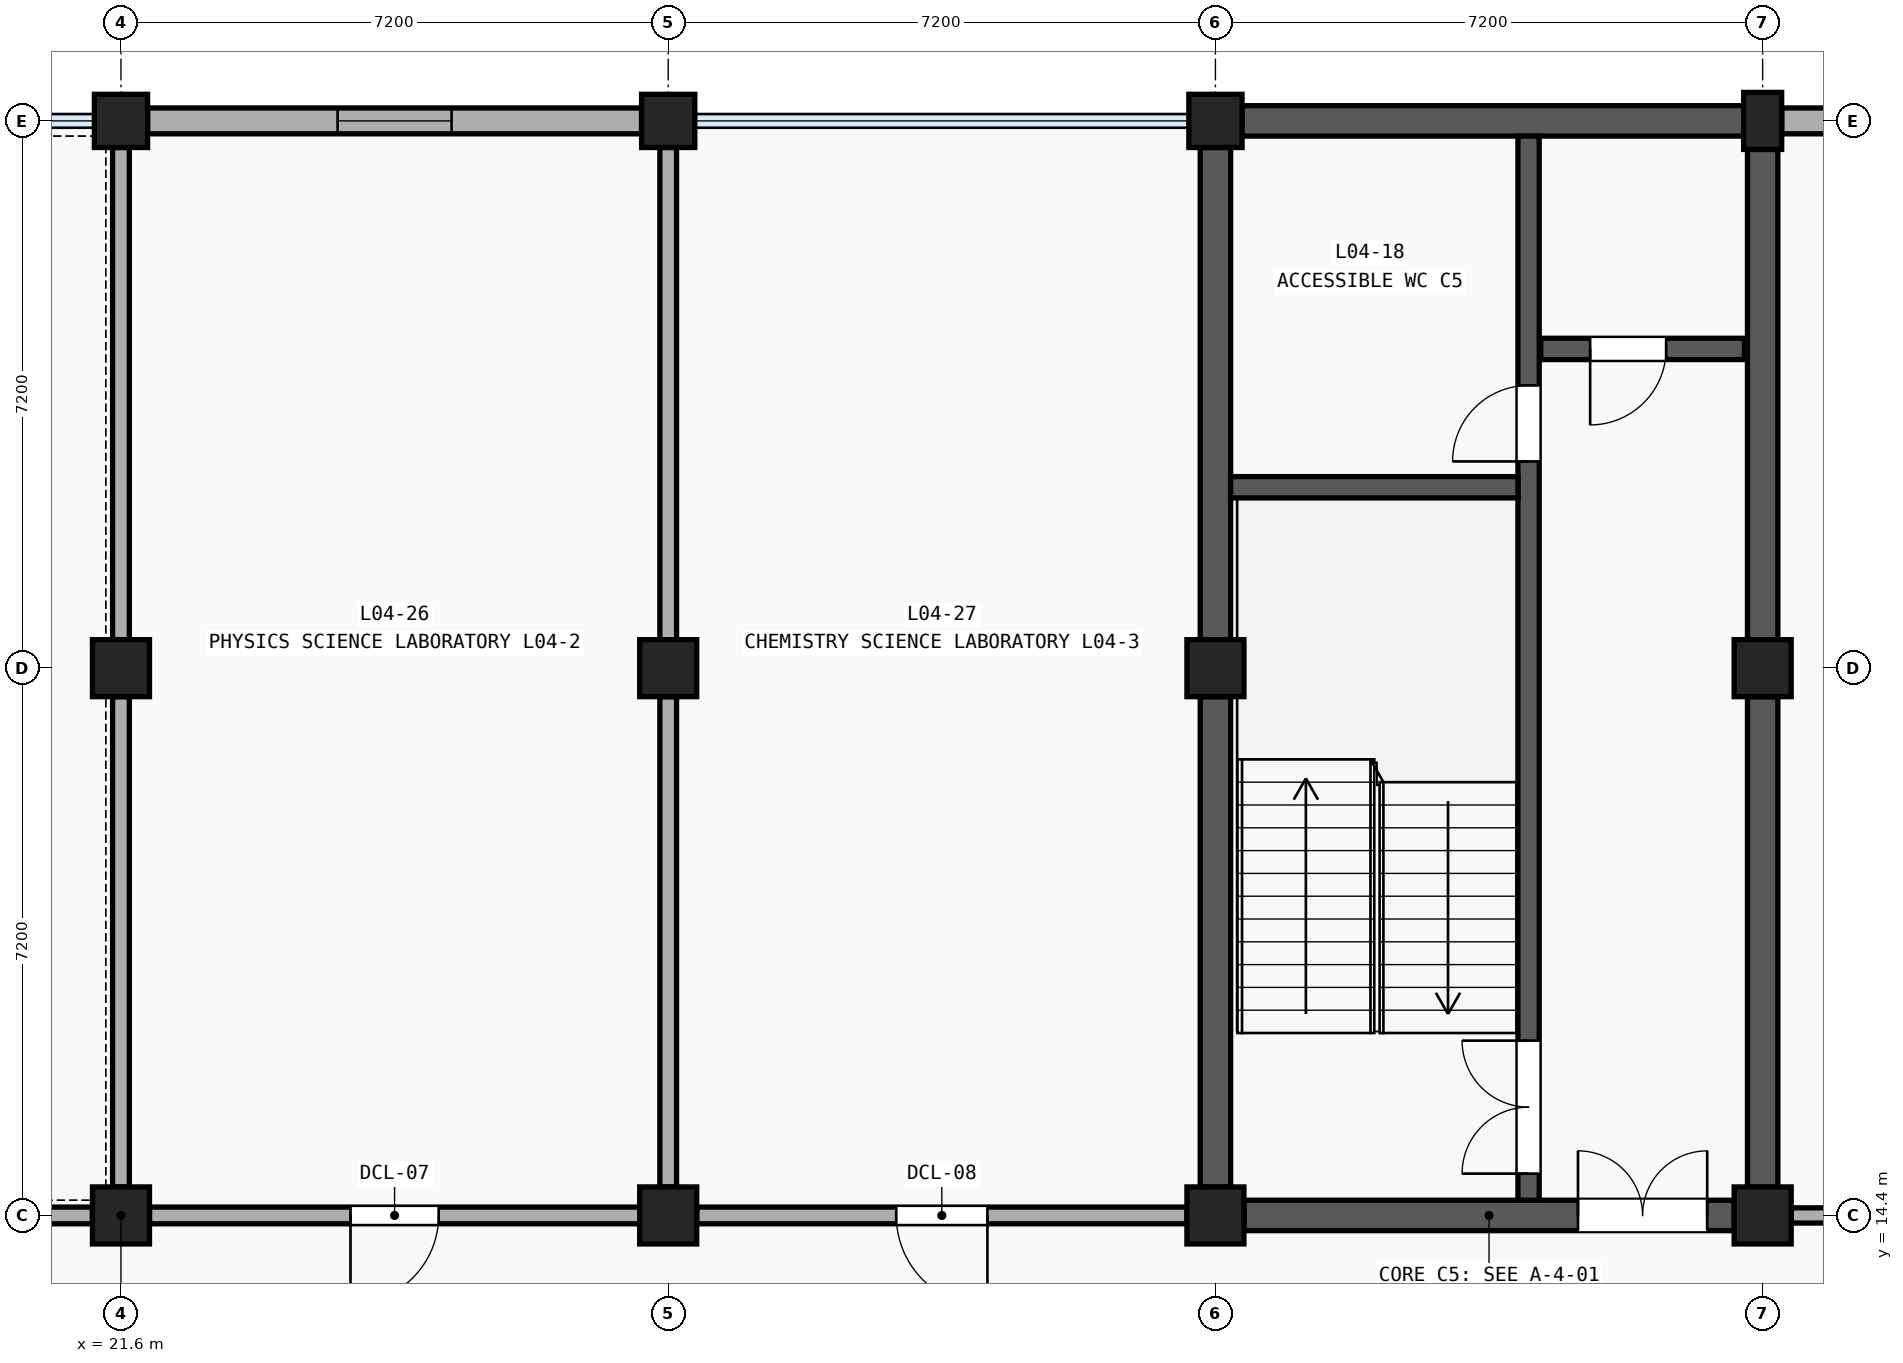
"""IFC4 building model, lengths in metres.
Left out: names, types, materials, properties, quantities, classifications, styles, units other than length and angle.
Written with IfcOpenShell. Run it as: python <this file> out.ifc"""

import sys

from ifc_helpers import new_model, si_unit, direction, frame, frame_2d, origin, origin_2d, place, context, subcontext, project, spatial, rectangle, extrude, element, fill, save


model = new_model("IFC4")
c1 = context("Model", 3, precision=1e-05, world=origin(), true_north=direction((0.0, 1.0)))
c2 = subcontext(c1, "Body", "Model", "MODEL_VIEW")
j1 = project(units=[si_unit("LENGTHUNIT", "METRE"), si_unit("PLANEANGLEUNIT", "RADIAN")], contexts=[c1])
p1 = place(None, origin())
s1 = spatial("IfcSite", under=j1, at=p1, CompositionType="ELEMENT")
p2 = place(p1, origin())
s2 = spatial("IfcBuilding", under=s1, at=p2, CompositionType="ELEMENT")
p3 = place(p2, frame((0.0, 0.0, 18.6)))
s3 = spatial("IfcBuildingStorey", under=s2, at=p3, CompositionType="ELEMENT", Elevation=18.6)
for number, where, z_axis, x_axis in (
    (1, (21.6, 14.4, 0.0), (0.0, 0.0, 1.0), (1.0, 0.0, 0.0)),
    (2, (21.6, 21.6, 0.0), (0.0, 0.0, 1.0), (1.0, 0.0, 0.0)),
):
    element("IfcColumn", number, at=place(p3, frame(where, z_axis=z_axis, x_axis=x_axis)), inside=s3, PredefinedType="COLUMN", context=c2, shape_type="SweptSolid", body=[
        extrude(rectangle(XDim=0.75, YDim=0.75, at=origin_2d()), origin(), (0.0, 0.0, 1.0), 4.0),
    ])
p4 = place(p3, frame((21.6, 28.8, 0.0), z_axis=(0.0, 0.0, 1.0), x_axis=(1.0, 0.0, 0.0)))
e3 = element("IfcColumn", 3, at=p4, inside=s3, PredefinedType="COLUMN", context=c2, shape_type="SweptSolid", body=[
    extrude(rectangle(XDim=0.7, YDim=0.7, at=origin_2d()), origin(), (0.0, 0.0, 1.0), 4.0),
])
for number, where, z_axis, x_axis in (
    (4, (28.8, 14.4, 0.0), (0.0, 0.0, 1.0), (1.0, 0.0, 0.0)),
    (5, (28.8, 21.6, 0.0), (0.0, 0.0, 1.0), (1.0, 0.0, 0.0)),
):
    element("IfcColumn", number, at=place(p3, frame(where, z_axis=z_axis, x_axis=x_axis)), inside=s3, PredefinedType="COLUMN", context=c2, shape_type="SweptSolid", body=[
        extrude(rectangle(XDim=0.75, YDim=0.75, at=origin_2d()), origin(), (0.0, 0.0, 1.0), 4.0),
    ])
p5 = place(p3, frame((28.8, 28.8, 0.0), z_axis=(0.0, 0.0, 1.0), x_axis=(1.0, 0.0, 0.0)))
e6 = element("IfcColumn", 6, at=p5, inside=s3, PredefinedType="COLUMN", context=c2, shape_type="SweptSolid", body=[
    extrude(rectangle(XDim=0.7, YDim=0.7, at=origin_2d()), origin(), (0.0, 0.0, 1.0), 4.0),
])
for number, where, z_axis, x_axis in (
    (7, (36.0, 14.4, 0.0), (0.0, 0.0, 1.0), (1.0, 0.0, 0.0)),
    (8, (36.0, 21.6, 0.0), (0.0, 0.0, 1.0), (1.0, 0.0, 0.0)),
):
    element("IfcColumn", number, at=place(p3, frame(where, z_axis=z_axis, x_axis=x_axis)), inside=s3, PredefinedType="COLUMN", context=c2, shape_type="SweptSolid", body=[
        extrude(rectangle(XDim=0.75, YDim=0.75, at=origin_2d()), origin(), (0.0, 0.0, 1.0), 4.0),
    ])
p6 = place(p3, frame((36.0, 28.8, 0.0), z_axis=(0.0, 0.0, 1.0), x_axis=(1.0, 0.0, 0.0)))
e9 = element("IfcColumn", 9, at=p6, inside=s3, PredefinedType="COLUMN", context=c2, shape_type="SweptSolid", body=[
    extrude(rectangle(XDim=0.7, YDim=0.7, at=origin_2d()), origin(), (0.0, 0.0, 1.0), 4.0),
])
for number, where, z_axis, x_axis in (
    (10, (43.2, 14.4, 0.0), (0.0, 0.0, 1.0), (1.0, 0.0, 0.0)),
    (11, (43.2, 21.6, 0.0), (0.0, 0.0, 1.0), (1.0, 0.0, 0.0)),
):
    element("IfcColumn", number, at=place(p3, frame(where, z_axis=z_axis, x_axis=x_axis)), inside=s3, PredefinedType="COLUMN", context=c2, shape_type="SweptSolid", body=[
        extrude(rectangle(XDim=0.75, YDim=0.75, at=origin_2d()), origin(), (0.0, 0.0, 1.0), 4.0),
    ])
p7 = place(p3, frame((43.2, 28.8, 0.0), z_axis=(0.0, 0.0, 1.0), x_axis=(1.0, 0.0, 0.0)))
e12 = element("IfcColumn", 12, at=p7, inside=s3, PredefinedType="PILASTER", context=c2, shape_type="SweptSolid", body=[
    extrude(rectangle(XDim=0.5, YDim=0.75, at=origin_2d()), origin(), (0.0, 0.0, 1.0), 4.0),
])
p8 = place(p3, frame((21.95, 28.8, 0.0), z_axis=(0.0, 0.0, 1.0), x_axis=(1.0, 0.0, 0.0)))
e13 = element("IfcWall", 13, at=p8, inside=s3, PredefinedType="SOLIDWALL", context=c2, shape_type="SweptSolid", body=[
    extrude(rectangle(XDim=6.5, YDim=0.34, at=frame_2d((3.25, 0.0))), origin(), (0.0, 0.0, 1.0), 3.11),
])
p9 = place(p8, frame((2.5, 0.0, 1.1)))
e14 = element("IfcOpeningElement", 14, at=p9, cuts=e13, PredefinedType="OPENING", context=c2, shape_type="SweptSolid", body=[
    extrude(rectangle(XDim=1.5, YDim=1.35, at=frame_2d((0.75, 0.675))), frame((0.0, 0.182, 0.0), z_axis=(0.0, -1.0, 0.0), x_axis=(1.0, 0.0, 0.0)), (0.0, 0.0, 1.0), 0.364),
])
p10 = place(p3, frame((43.45, 28.8, 0.0), z_axis=(0.0, 0.0, 1.0), x_axis=(1.0, 0.0, 0.0)))
e15 = element("IfcWall", 15, at=p10, inside=s3, PredefinedType="SOLIDWALL", context=c2, shape_type="SweptSolid", body=[
    extrude(rectangle(XDim=6.6, YDim=0.34, at=frame_2d((3.3, 0.0))), origin(), (0.0, 0.0, 1.0), 3.11),
])
p11 = place(p10, frame((2.55, 0.0, 1.1)))
e16 = element("IfcOpeningElement", 16, at=p11, cuts=e15, PredefinedType="OPENING", context=c2, shape_type="SweptSolid", body=[
    extrude(rectangle(XDim=1.5, YDim=1.35, at=frame_2d((0.75, 0.675))), frame((0.0, 0.182, 0.0), z_axis=(0.0, -1.0, 0.0), x_axis=(1.0, 0.0, 0.0)), (0.0, 0.0, 1.0), 0.364),
])
p12 = place(p3, frame((36.0, 14.775, 0.0), z_axis=(0.0, 0.0, 1.0), x_axis=(0.0, 1.0, 0.0)))
e17 = element("IfcWall", 17, at=p12, inside=s3, PredefinedType="SHEAR", context=c2, shape_type="SweptSolid", body=[
    extrude(rectangle(XDim=6.45, YDim=0.4, at=frame_2d((3.225, 0.0))), origin(), (0.0, 0.0, 1.0), 2.97),
])
p13 = place(p3, frame((36.0, 21.975, 0.0), z_axis=(0.0, 0.0, 1.0), x_axis=(0.0, 1.0, 0.0)))
e18 = element("IfcWall", 18, at=p13, inside=s3, PredefinedType="SHEAR", context=c2, shape_type="SweptSolid", body=[
    extrude(rectangle(XDim=6.475, YDim=0.4, at=frame_2d((3.237, 0.0))), origin(), (0.0, 0.0, 1.0), 2.97),
])
p14 = place(p3, frame((43.2, 14.775, 0.0), z_axis=(0.0, 0.0, 1.0), x_axis=(0.0, 1.0, 0.0)))
e19 = element("IfcWall", 19, at=p14, inside=s3, PredefinedType="SHEAR", context=c2, shape_type="SweptSolid", body=[
    extrude(rectangle(XDim=6.45, YDim=0.4, at=frame_2d((3.225, 0.0))), origin(), (0.0, 0.0, 1.0), 2.97),
])
p15 = place(p3, frame((43.2, 21.975, 0.0), z_axis=(0.0, 0.0, 1.0), x_axis=(0.0, 1.0, 0.0)))
e20 = element("IfcWall", 20, at=p15, inside=s3, PredefinedType="SHEAR", context=c2, shape_type="SweptSolid", body=[
    extrude(rectangle(XDim=6.45, YDim=0.4, at=frame_2d((3.225, 0.0))), origin(), (0.0, 0.0, 1.0), 2.97),
])
p16 = place(p3, frame((36.375, 14.4, 0.0), z_axis=(0.0, 0.0, 1.0), x_axis=(1.0, 0.0, 0.0)))
e21 = element("IfcWall", 21, at=p16, inside=s3, PredefinedType="SHEAR", context=c2, shape_type="SweptSolid", body=[
    extrude(rectangle(XDim=6.45, YDim=0.4, at=frame_2d((3.225, 0.0))), origin(), (0.0, 0.0, 1.0), 2.97),
])
p17 = place(p16, frame((4.395, 0.0, 0.0)))
e22 = element("IfcOpeningElement", 22, at=p17, cuts=e21, PredefinedType="OPENING", context=c2, shape_type="SweptSolid", body=[
    extrude(rectangle(XDim=1.7, YDim=2.25, at=frame_2d((0.85, 1.125))), frame((0.0, 0.212, 0.0), z_axis=(0.0, -1.0, 0.0), x_axis=(1.0, 0.0, 0.0)), (0.0, 0.0, 1.0), 0.424),
])
p18 = place(p3, frame((36.35, 28.8, 0.0), z_axis=(0.0, 0.0, 1.0), x_axis=(1.0, 0.0, 0.0)))
e23 = element("IfcWall", 23, at=p18, inside=s3, PredefinedType="SHEAR", context=c2, shape_type="SweptSolid", body=[
    extrude(rectangle(XDim=6.6, YDim=0.4, at=frame_2d((3.3, 0.0))), origin(), (0.0, 0.0, 1.0), 3.11),
])
p19 = place(p3, frame((40.12, 14.6, 0.0), z_axis=(0.0, 0.0, 1.0), x_axis=(0.0, 1.0, 0.0)))
e24 = element("IfcWall", 24, at=p19, inside=s3, PredefinedType="SHEAR", context=c2, shape_type="SweptSolid", body=[
    extrude(rectangle(XDim=14.0, YDim=0.28, at=frame_2d((7.0, 0.0))), origin(), (0.0, 0.0, 1.0), 3.74),
])
p20 = place(p19, frame((0.35, 0.0, 0.0)))
e25 = element("IfcOpeningElement", 25, at=p20, cuts=e24, PredefinedType="OPENING", context=c2, shape_type="SweptSolid", body=[
    extrude(rectangle(XDim=1.75, YDim=2.15, at=frame_2d((0.875, 1.075))), frame((0.0, 0.152, 0.0), z_axis=(0.0, -1.0, 0.0), x_axis=(1.0, 0.0, 0.0)), (0.0, 0.0, 1.0), 0.304),
])
p21 = place(p19, frame((9.72, 0.0, 0.0)))
e26 = element("IfcOpeningElement", 26, at=p21, cuts=e24, PredefinedType="OPENING", context=c2, shape_type="SweptSolid", body=[
    extrude(rectangle(XDim=1.0, YDim=2.15, at=frame_2d((0.5, 1.075))), frame((0.0, 0.152, 0.0), z_axis=(0.0, -1.0, 0.0), x_axis=(1.0, 0.0, 0.0)), (0.0, 0.0, 1.0), 0.304),
])
p22 = place(p3, frame((36.2, 23.98, 0.0), z_axis=(0.0, 0.0, 1.0), x_axis=(1.0, 0.0, 0.0)))
e27 = element("IfcWall", 27, at=p22, inside=s3, PredefinedType="SHEAR", context=c2, shape_type="SweptSolid", body=[
    extrude(rectangle(XDim=3.78, YDim=0.28, at=frame_2d((1.89, 0.0))), origin(), (0.0, 0.0, 1.0), 3.74),
])
p23 = place(p3, frame((40.28, 25.8, 0.0), z_axis=(0.0, 0.0, 1.0), x_axis=(1.0, 0.0, 0.0)))
e28 = element("IfcWall", 28, at=p23, inside=s3, PredefinedType="SHEAR", context=c2, shape_type="SweptSolid", body=[
    extrude(rectangle(XDim=2.68, YDim=0.28, at=frame_2d((1.34, 0.0))), origin(), (0.0, 0.0, 1.0), 3.74),
])
p24 = place(p23, frame((0.65, 0.0, 0.0)))
e29 = element("IfcOpeningElement", 29, at=p24, cuts=e28, PredefinedType="OPENING", context=c2, shape_type="SweptSolid", body=[
    extrude(rectangle(XDim=1.0, YDim=2.15, at=frame_2d((0.5, 1.075))), frame((0.0, 0.152, 0.0), z_axis=(0.0, -1.0, 0.0), x_axis=(1.0, 0.0, 0.0)), (0.0, 0.0, 1.0), 0.304),
])
p25 = place(p3, frame((14.75, 14.4, 0.0), z_axis=(0.0, 0.0, 1.0), x_axis=(1.0, 0.0, 0.0)))
e30 = element("IfcWall", 30, at=p25, inside=s3, PredefinedType="PARTITIONING", context=c2, shape_type="SweptSolid", body=[
    extrude(rectangle(XDim=6.475, YDim=0.22, at=frame_2d((3.238, 0.0))), origin(), (0.0, 0.0, 1.0), 3.04),
])
p26 = place(p25, frame((2.677, 0.0, 0.0)))
e31 = element("IfcOpeningElement", 31, at=p26, cuts=e30, PredefinedType="OPENING", context=c2, shape_type="SweptSolid", body=[
    extrude(rectangle(XDim=1.12, YDim=2.2, at=frame_2d((0.56, 1.1))), frame((0.0, 0.122, 0.0), z_axis=(0.0, -1.0, 0.0), x_axis=(1.0, 0.0, 0.0)), (0.0, 0.0, 1.0), 0.244),
])
p27 = place(p3, frame((21.6, 14.775, 0.0), z_axis=(0.0, 0.0, 1.0), x_axis=(0.0, 1.0, 0.0)))
e32 = element("IfcWall", 32, at=p27, inside=s3, PredefinedType="PARTITIONING", context=c2, shape_type="SweptSolid", body=[
    extrude(rectangle(XDim=6.45, YDim=0.22, at=frame_2d((3.225, 0.0))), origin(), (0.0, 0.0, 1.0), 2.97),
])
p28 = place(p3, frame((21.6, 21.975, 0.0), z_axis=(0.0, 0.0, 1.0), x_axis=(0.0, 1.0, 0.0)))
e33 = element("IfcWall", 33, at=p28, inside=s3, PredefinedType="PARTITIONING", context=c2, shape_type="SweptSolid", body=[
    extrude(rectangle(XDim=6.475, YDim=0.22, at=frame_2d((3.237, 0.0))), origin(), (0.0, 0.0, 1.0), 2.97),
])
p29 = place(p3, frame((21.975, 14.4, 0.0), z_axis=(0.0, 0.0, 1.0), x_axis=(1.0, 0.0, 0.0)))
e34 = element("IfcWall", 34, at=p29, inside=s3, PredefinedType="PARTITIONING", context=c2, shape_type="SweptSolid", body=[
    extrude(rectangle(XDim=6.45, YDim=0.22, at=frame_2d((3.225, 0.0))), origin(), (0.0, 0.0, 1.0), 2.97),
])
p30 = place(p29, frame((2.645, 0.0, 0.0)))
e35 = element("IfcOpeningElement", 35, at=p30, cuts=e34, PredefinedType="OPENING", context=c2, shape_type="SweptSolid", body=[
    extrude(rectangle(XDim=1.16, YDim=2.22, at=frame_2d((0.58, 1.11))), frame((0.0, 0.122, 0.0), z_axis=(0.0, -1.0, 0.0), x_axis=(1.0, 0.0, 0.0)), (0.0, 0.0, 1.0), 0.244),
])
p31 = place(p3, frame((28.8, 14.775, 0.0), z_axis=(0.0, 0.0, 1.0), x_axis=(0.0, 1.0, 0.0)))
e36 = element("IfcWall", 36, at=p31, inside=s3, PredefinedType="PARTITIONING", context=c2, shape_type="SweptSolid", body=[
    extrude(rectangle(XDim=6.45, YDim=0.22, at=frame_2d((3.225, 0.0))), origin(), (0.0, 0.0, 1.0), 2.97),
])
p32 = place(p3, frame((28.8, 21.975, 0.0), z_axis=(0.0, 0.0, 1.0), x_axis=(0.0, 1.0, 0.0)))
e37 = element("IfcWall", 37, at=p32, inside=s3, PredefinedType="PARTITIONING", context=c2, shape_type="SweptSolid", body=[
    extrude(rectangle(XDim=6.475, YDim=0.22, at=frame_2d((3.237, 0.0))), origin(), (0.0, 0.0, 1.0), 2.97),
])
p33 = place(p3, frame((29.175, 14.4, 0.0), z_axis=(0.0, 0.0, 1.0), x_axis=(1.0, 0.0, 0.0)))
e38 = element("IfcWall", 38, at=p33, inside=s3, PredefinedType="PARTITIONING", context=c2, shape_type="SweptSolid", body=[
    extrude(rectangle(XDim=6.45, YDim=0.22, at=frame_2d((3.225, 0.0))), origin(), (0.0, 0.0, 1.0), 2.97),
])
p34 = place(p33, frame((2.625, 0.0, 0.0)))
e39 = element("IfcOpeningElement", 39, at=p34, cuts=e38, PredefinedType="OPENING", context=c2, shape_type="SweptSolid", body=[
    extrude(rectangle(XDim=1.2, YDim=2.24, at=frame_2d((0.6, 1.12))), frame((0.0, 0.122, 0.0), z_axis=(0.0, -1.0, 0.0), x_axis=(1.0, 0.0, 0.0)), (0.0, 0.0, 1.0), 0.244),
])
p35 = place(p3, frame((43.575, 14.4, 0.0), z_axis=(0.0, 0.0, 1.0), x_axis=(1.0, 0.0, 0.0)))
e40 = element("IfcWall", 40, at=p35, inside=s3, PredefinedType="PARTITIONING", context=c2, shape_type="SweptSolid", body=[
    extrude(rectangle(XDim=6.45, YDim=0.2, at=frame_2d((3.225, 0.0))), origin(), (0.0, 0.0, 1.0), 3.04),
])
p36 = place(p35, frame((2.605, 0.0, 0.0)))
e41 = element("IfcOpeningElement", 41, at=p36, cuts=e40, PredefinedType="OPENING", context=c2, shape_type="SweptSolid", body=[
    extrude(rectangle(XDim=1.24, YDim=2.26, at=frame_2d((0.62, 1.13))), frame((0.0, 0.112, 0.0), z_axis=(0.0, -1.0, 0.0), x_axis=(1.0, 0.0, 0.0)), (0.0, 0.0, 1.0), 0.224),
])
p37 = place(p9, origin())
e42 = element("IfcWindow", 42, at=p37, inside=s3, PartitioningType="SINGLE_PANEL", PredefinedType="WINDOW", context=c2, shape_type="SweptSolid", body=[
    extrude(rectangle(XDim=1.5, YDim=1.35, at=frame_2d((0.75, 0.675))), frame((0.0, 0.03, 0.0), z_axis=(0.0, -1.0, 0.0), x_axis=(1.0, 0.0, 0.0)), (0.0, 0.0, 1.0), 0.06),
])
fill(e14, e42)
p38 = place(p17, origin())
e43 = element("IfcDoor", 43, at=p38, inside=s3, OperationType="DOUBLE_DOOR_SINGLE_SWING", PredefinedType="DOOR", context=c2, shape_type="SweptSolid", body=[
    extrude(rectangle(XDim=1.7, YDim=2.25, at=frame_2d((0.85, 1.125))), frame((0.0, 0.025, 0.0), z_axis=(0.0, -1.0, 0.0), x_axis=(1.0, 0.0, 0.0)), (0.0, 0.0, 1.0), 0.05),
])
fill(e22, e43)
p39 = place(p20, origin())
e44 = element("IfcDoor", 44, at=p39, inside=s3, OperationType="DOUBLE_DOOR_SINGLE_SWING", PredefinedType="DOOR", context=c2, shape_type="SweptSolid", body=[
    extrude(rectangle(XDim=1.75, YDim=2.15, at=frame_2d((0.875, 1.075))), frame((0.0, 0.025, 0.0), z_axis=(0.0, -1.0, 0.0), x_axis=(1.0, 0.0, 0.0)), (0.0, 0.0, 1.0), 0.05),
])
fill(e25, e44)
p40 = place(p21, origin())
e45 = element("IfcDoor", 45, at=p40, inside=s3, OperationType="SINGLE_SWING_LEFT", PredefinedType="DOOR", context=c2, shape_type="SweptSolid", body=[
    extrude(rectangle(XDim=1.0, YDim=2.15, at=frame_2d((0.5, 1.075))), frame((0.0, 0.025, 0.0), z_axis=(0.0, -1.0, 0.0), x_axis=(1.0, 0.0, 0.0)), (0.0, 0.0, 1.0), 0.05),
])
fill(e26, e45)
p41 = place(p24, frame((1.0, 0.0, 0.0), z_axis=(0.0, 0.0, 1.0), x_axis=(-1.0, 0.0, 0.0)))
e46 = element("IfcDoor", 46, at=p41, inside=s3, OperationType="SINGLE_SWING_RIGHT", PredefinedType="DOOR", context=c2, shape_type="SweptSolid", body=[
    extrude(rectangle(XDim=1.0, YDim=2.15, at=frame_2d((0.5, 1.075))), frame((0.0, 0.025, 0.0), z_axis=(0.0, -1.0, 0.0), x_axis=(1.0, 0.0, 0.0)), (0.0, 0.0, 1.0), 0.05),
])
fill(e29, e46)
p42 = place(p30, frame((1.16, 0.0, 0.0), z_axis=(0.0, 0.0, 1.0), x_axis=(-1.0, 0.0, 0.0)))
e47 = element("IfcDoor", 47, at=p42, inside=s3, OperationType="SINGLE_SWING_RIGHT", PredefinedType="DOOR", context=c2, shape_type="SweptSolid", body=[
    extrude(rectangle(XDim=1.16, YDim=2.22, at=frame_2d((0.58, 1.11))), frame((0.0, 0.025, 0.0), z_axis=(0.0, -1.0, 0.0), x_axis=(1.0, 0.0, 0.0)), (0.0, 0.0, 1.0), 0.05),
])
fill(e35, e47)
p43 = place(p34, frame((1.2, 0.0, 0.0), z_axis=(0.0, 0.0, 1.0), x_axis=(-1.0, 0.0, 0.0)))
e48 = element("IfcDoor", 48, at=p43, inside=s3, OperationType="SINGLE_SWING_LEFT", PredefinedType="DOOR", context=c2, shape_type="SweptSolid", body=[
    extrude(rectangle(XDim=1.2, YDim=2.24, at=frame_2d((0.6, 1.12))), frame((0.0, 0.025, 0.0), z_axis=(0.0, -1.0, 0.0), x_axis=(1.0, 0.0, 0.0)), (0.0, 0.0, 1.0), 0.05),
])
fill(e39, e48)
save(model, sys.argv[1])
